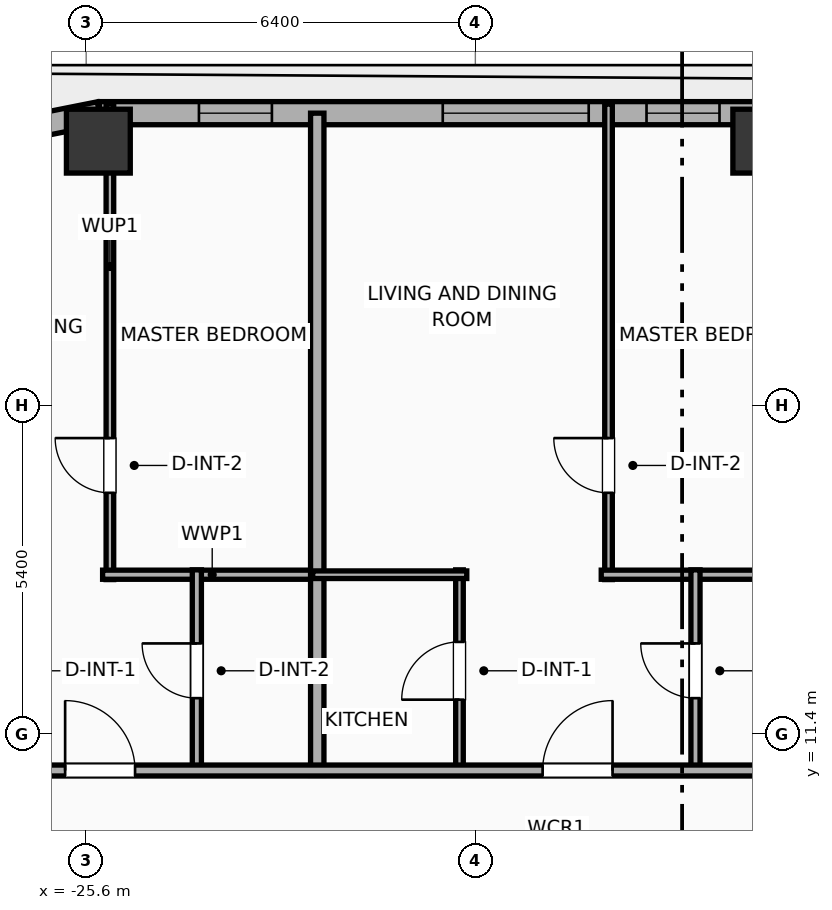
"""IFC4 building model, lengths in metres.
Left out: names, types, materials, properties, quantities, classifications, styles, units other than length and angle.
Written with IfcOpenShell. Run it as: python <this file> out.ifc"""

import sys

from ifc_helpers import new_model, si_unit, direction, frame, frame_2d, origin, origin_2d, place, context, subcontext, project, spatial, rectangle, hollow_rectangle, extrude, element, fill, save


model = new_model("IFC4")
c1 = context("Model", 3, precision=1e-05, world=origin(), true_north=direction((0.0, 1.0)))
c2 = subcontext(c1, "Body", "Model", "MODEL_VIEW")
j1 = project(units=[si_unit("LENGTHUNIT", "METRE"), si_unit("PLANEANGLEUNIT", "RADIAN")], contexts=[c1])
p1 = place(None, origin())
s1 = spatial("IfcSite", under=j1, at=p1, CompositionType="ELEMENT")
p2 = place(p1, origin())
s2 = spatial("IfcBuilding", under=s1, at=p2, CompositionType="ELEMENT")
p3 = place(p2, frame((0.0, 0.0, 85.8)))
s3 = spatial("IfcBuildingStorey", under=s2, at=p3, CompositionType="ELEMENT", Elevation=85.8)
for number, where, z_axis, x_axis in (
    (1, (-14.44, 21.15, -0.4), (0.0, 0.0, 1.0), (1.0, 0.0, 0.0)),
    (2, (-25.4, 21.15, -0.4), (0.0, 0.0, 1.0), (1.0, 0.0, 0.0)),
):
    element("IfcColumn", number, at=place(p3, frame(where, z_axis=z_axis, x_axis=x_axis)), inside=s3, PredefinedType="COLUMN", context=c2, shape_type="SweptSolid", body=[
        extrude(hollow_rectangle(XDim=1.05, YDim=1.05, WallThickness=0.036, at=origin_2d()), origin(), (0.0, 0.0, 1.0), 4.3),
    ])
p4 = place(p3, frame((-26.857, 21.316, 0.0), z_axis=(0.0, 0.0, 1.0), x_axis=(0.980755066645, 0.195242155415, 0.0)))
e3 = element("IfcWall", 3, at=p4, inside=s3, PredefinedType="ELEMENTEDWALL", context=c2, shape_type="SweptSolid", body=[
    extrude(rectangle(XDim=1.504, YDim=0.38, at=frame_2d((0.752, 0.0))), origin(), (0.0, 0.0, 1.0), 2.54),
])
p5 = place(p3, frame((-25.381, 21.61, 0.0), z_axis=(0.0, 0.0, 1.0), x_axis=(1.0, 0.0, 0.0)))
e4 = element("IfcWall", 4, at=p5, inside=s3, PredefinedType="ELEMENTEDWALL", context=c2, shape_type="SweptSolid", body=[
    extrude(rectangle(XDim=54.763, YDim=0.38, at=frame_2d((27.381, 0.0))), origin(), (0.0, 0.0, 1.0), 2.54),
])
p6 = place(p5, frame((5.645, 0.0, 0.75)))
e5 = element("IfcOpeningElement", 5, at=p6, cuts=e4, PredefinedType="OPENING", context=c2, shape_type="SweptSolid", body=[
    extrude(rectangle(XDim=2.4, YDim=1.45, at=frame_2d((1.2, 0.725))), frame((0.0, 0.2, 0.0), z_axis=(0.0, -1.0, 0.0), x_axis=(1.0, 0.0, 0.0)), (0.0, 0.0, 1.0), 0.4),
])
p7 = place(p5, frame((47.567, 0.0, 0.75)))
e6 = element("IfcOpeningElement", 6, at=p7, cuts=e4, PredefinedType="OPENING", context=c2, shape_type="SweptSolid", body=[
    extrude(rectangle(XDim=2.4, YDim=1.45, at=frame_2d((1.2, 0.725))), frame((0.0, 0.2, 0.0), z_axis=(0.0, -1.0, 0.0), x_axis=(1.0, 0.0, 0.0)), (0.0, 0.0, 1.0), 0.4),
])
p8 = place(p5, frame((1.635, 0.0, 0.55)))
e7 = element("IfcOpeningElement", 7, at=p8, cuts=e4, PredefinedType="OPENING", context=c2, shape_type="SweptSolid", body=[
    extrude(rectangle(XDim=1.2, YDim=1.15, at=frame_2d((0.6, 0.575))), frame((0.0, 0.2, 0.0), z_axis=(0.0, -1.0, 0.0), x_axis=(1.0, 0.0, 0.0)), (0.0, 0.0, 1.0), 0.4),
])
p9 = place(p5, frame((8.996, 0.0, 0.55)))
e8 = element("IfcOpeningElement", 8, at=p9, cuts=e4, PredefinedType="OPENING", context=c2, shape_type="SweptSolid", body=[
    extrude(rectangle(XDim=1.2, YDim=1.15, at=frame_2d((0.6, 0.575))), frame((0.0, 0.2, 0.0), z_axis=(0.0, -1.0, 0.0), x_axis=(1.0, 0.0, 0.0)), (0.0, 0.0, 1.0), 0.4),
])
p10 = place(p5, frame((13.576, 0.0, 0.55)))
e9 = element("IfcOpeningElement", 9, at=p10, cuts=e4, PredefinedType="OPENING", context=c2, shape_type="SweptSolid", body=[
    extrude(rectangle(XDim=1.2, YDim=1.15, at=frame_2d((0.6, 0.575))), frame((0.0, 0.2, 0.0), z_axis=(0.0, -1.0, 0.0), x_axis=(1.0, 0.0, 0.0)), (0.0, 0.0, 1.0), 0.4),
])
p11 = place(p5, frame((17.676, 0.0, 0.55)))
e10 = element("IfcOpeningElement", 10, at=p11, cuts=e4, PredefinedType="OPENING", context=c2, shape_type="SweptSolid", body=[
    extrude(rectangle(XDim=1.2, YDim=1.15, at=frame_2d((0.6, 0.575))), frame((0.0, 0.2, 0.0), z_axis=(0.0, -1.0, 0.0), x_axis=(1.0, 0.0, 0.0)), (0.0, 0.0, 1.0), 0.4),
])
p12 = place(p5, frame((20.319, 0.0, 0.55)))
e11 = element("IfcOpeningElement", 11, at=p12, cuts=e4, PredefinedType="OPENING", context=c2, shape_type="SweptSolid", body=[
    extrude(rectangle(XDim=0.85, YDim=1.15, at=frame_2d((0.425, 0.575))), frame((0.0, 0.2, 0.0), z_axis=(0.0, -1.0, 0.0), x_axis=(1.0, 0.0, 0.0)), (0.0, 0.0, 1.0), 0.4),
])
p13 = place(p5, frame((24.844, 0.0, 0.55)))
e12 = element("IfcOpeningElement", 12, at=p13, cuts=e4, PredefinedType="OPENING", context=c2, shape_type="SweptSolid", body=[
    extrude(rectangle(XDim=1.2, YDim=1.15, at=frame_2d((0.6, 0.575))), frame((0.0, 0.2, 0.0), z_axis=(0.0, -1.0, 0.0), x_axis=(1.0, 0.0, 0.0)), (0.0, 0.0, 1.0), 0.4),
])
p14 = place(p5, frame((29.976, 0.0, 0.55)))
e13 = element("IfcOpeningElement", 13, at=p14, cuts=e4, PredefinedType="OPENING", context=c2, shape_type="SweptSolid", body=[
    extrude(rectangle(XDim=1.2, YDim=1.15, at=frame_2d((0.6, 0.575))), frame((0.0, 0.2, 0.0), z_axis=(0.0, -1.0, 0.0), x_axis=(1.0, 0.0, 0.0)), (0.0, 0.0, 1.0), 0.4),
])
p15 = place(p5, frame((34.076, 0.0, 0.55)))
e14 = element("IfcOpeningElement", 14, at=p15, cuts=e4, PredefinedType="OPENING", context=c2, shape_type="SweptSolid", body=[
    extrude(rectangle(XDim=1.2, YDim=1.15, at=frame_2d((0.6, 0.575))), frame((0.0, 0.2, 0.0), z_axis=(0.0, -1.0, 0.0), x_axis=(1.0, 0.0, 0.0)), (0.0, 0.0, 1.0), 0.4),
])
p16 = place(p5, frame((38.176, 0.0, 0.55)))
e15 = element("IfcOpeningElement", 15, at=p16, cuts=e4, PredefinedType="OPENING", context=c2, shape_type="SweptSolid", body=[
    extrude(rectangle(XDim=1.2, YDim=1.15, at=frame_2d((0.6, 0.575))), frame((0.0, 0.2, 0.0), z_axis=(0.0, -1.0, 0.0), x_axis=(1.0, 0.0, 0.0)), (0.0, 0.0, 1.0), 0.4),
])
p17 = place(p5, frame((41.796, 0.0, 0.55)))
e16 = element("IfcOpeningElement", 16, at=p17, cuts=e4, PredefinedType="OPENING", context=c2, shape_type="SweptSolid", body=[
    extrude(rectangle(XDim=1.2, YDim=1.15, at=frame_2d((0.6, 0.575))), frame((0.0, 0.2, 0.0), z_axis=(0.0, -1.0, 0.0), x_axis=(1.0, 0.0, 0.0)), (0.0, 0.0, 1.0), 0.4),
])
p18 = place(p5, frame((45.336, 0.0, 0.55)))
e17 = element("IfcOpeningElement", 17, at=p18, cuts=e4, PredefinedType="OPENING", context=c2, shape_type="SweptSolid", body=[
    extrude(rectangle(XDim=1.2, YDim=1.15, at=frame_2d((0.6, 0.575))), frame((0.0, 0.2, 0.0), z_axis=(0.0, -1.0, 0.0), x_axis=(1.0, 0.0, 0.0)), (0.0, 0.0, 1.0), 0.4),
])
p19 = place(p5, frame((53.022, 0.0, 0.55)))
e18 = element("IfcOpeningElement", 18, at=p19, cuts=e4, PredefinedType="OPENING", context=c2, shape_type="SweptSolid", body=[
    extrude(rectangle(XDim=0.85, YDim=1.15, at=frame_2d((0.425, 0.575))), frame((0.0, 0.2, 0.0), z_axis=(0.0, -1.0, 0.0), x_axis=(1.0, 0.0, 0.0)), (0.0, 0.0, 1.0), 0.4),
])
p20 = place(p3, frame((-25.21, 13.94, 0.0), z_axis=(0.0, 0.0, 1.0), x_axis=(0.0, 1.0, 0.0)))
e19 = element("IfcWall", 19, at=p20, inside=s3, PredefinedType="PARTITIONING", context=c2, shape_type="SweptSolid", body=[
    extrude(rectangle(XDim=7.82, YDim=0.125, at=frame_2d((3.91, 0.0))), origin(), (0.0, 0.0, 1.0), 3.65),
])
p21 = place(p20, frame((1.427, 0.0, 0.0)))
e20 = element("IfcOpeningElement", 20, at=p21, cuts=e19, PredefinedType="OPENING", context=c2, shape_type="SweptSolid", body=[
    extrude(rectangle(XDim=0.9, YDim=2.05, at=frame_2d((0.45, 1.025))), frame((0.0, 0.073, 0.0), z_axis=(0.0, -1.0, 0.0), x_axis=(1.0, 0.0, 0.0)), (0.0, 0.0, 1.0), 0.145),
])
p22 = place(p3, frame((-25.33, 14.02, 0.0), z_axis=(0.0, 0.0, 1.0), x_axis=(1.0, 0.0, 0.0)))
e21 = element("IfcWall", 21, at=p22, inside=s3, PredefinedType="PLUMBINGWALL", context=c2, shape_type="SweptSolid", body=[
    extrude(rectangle(XDim=3.605, YDim=0.15, at=frame_2d((1.802, 0.0))), origin(), (0.0, 0.0, 1.0), 3.65),
])
p23 = place(p3, frame((-23.78, 10.78, 0.0), z_axis=(0.0, 0.0, 1.0), x_axis=(0.0, 1.0, 0.0)))
e22 = element("IfcWall", 22, at=p23, inside=s3, PredefinedType="PLUMBINGWALL", context=c2, shape_type="SweptSolid", body=[
    extrude(rectangle(XDim=3.32, YDim=0.15, at=frame_2d((1.66, 0.0))), origin(), (0.0, 0.0, 1.0), 3.65),
])
p24 = place(p23, frame((1.21, 0.0, 0.0)))
e23 = element("IfcOpeningElement", 23, at=p24, cuts=e22, PredefinedType="OPENING", context=c2, shape_type="SweptSolid", body=[
    extrude(rectangle(XDim=0.9, YDim=2.05, at=frame_2d((0.45, 1.025))), frame((0.0, 0.085, 0.0), z_axis=(0.0, -1.0, 0.0), x_axis=(1.0, 0.0, 0.0)), (0.0, 0.0, 1.0), 0.17),
])
p25 = place(p3, frame((-21.8, 10.72, 0.0), z_axis=(0.0, 0.0, 1.0), x_axis=(0.0, 1.0, 0.0)))
e24 = element("IfcWall", 24, at=p25, inside=s3, PredefinedType="PARTITIONING", context=c2, shape_type="SweptSolid", body=[
    extrude(rectangle(XDim=10.89, YDim=0.22, at=frame_2d((5.445, 0.0))), origin(), (0.0, 0.0, 1.0), 3.65),
])
p26 = place(p3, frame((-17.01, 13.94, 0.0), z_axis=(0.0, 0.0, 1.0), x_axis=(0.0, 1.0, 0.0)))
e25 = element("IfcWall", 25, at=p26, inside=s3, PredefinedType="PARTITIONING", context=c2, shape_type="SweptSolid", body=[
    extrude(rectangle(XDim=7.82, YDim=0.125, at=frame_2d((3.91, 0.0))), origin(), (0.0, 0.0, 1.0), 3.65),
])
p27 = place(p26, frame((1.427, 0.0, 0.0)))
e26 = element("IfcOpeningElement", 26, at=p27, cuts=e25, PredefinedType="OPENING", context=c2, shape_type="SweptSolid", body=[
    extrude(rectangle(XDim=0.9, YDim=2.05, at=frame_2d((0.45, 1.025))), frame((0.0, 0.073, 0.0), z_axis=(0.0, -1.0, 0.0), x_axis=(1.0, 0.0, 0.0)), (0.0, 0.0, 1.0), 0.145),
])
p28 = place(p3, frame((-17.13, 14.02, 0.0), z_axis=(0.0, 0.0, 1.0), x_axis=(1.0, 0.0, 0.0)))
e27 = element("IfcWall", 27, at=p28, inside=s3, PredefinedType="PLUMBINGWALL", context=c2, shape_type="SweptSolid", body=[
    extrude(rectangle(XDim=3.605, YDim=0.15, at=frame_2d((1.802, 0.0))), origin(), (0.0, 0.0, 1.0), 3.65),
])
p29 = place(p3, frame((-19.461, 10.78, 0.0), z_axis=(0.0, 0.0, 1.0), x_axis=(0.0, 1.0, 0.0)))
e28 = element("IfcWall", 28, at=p29, inside=s3, PredefinedType="PARTITIONING", context=c2, shape_type="SweptSolid", body=[
    extrude(rectangle(XDim=3.32, YDim=0.125, at=frame_2d((1.66, 0.0))), origin(), (0.0, 0.0, 1.0), 3.65),
])
p30 = place(p29, frame((1.185, 0.0, 0.0)))
e29 = element("IfcOpeningElement", 29, at=p30, cuts=e28, PredefinedType="OPENING", context=c2, shape_type="SweptSolid", body=[
    extrude(rectangle(XDim=0.95, YDim=2.05, at=frame_2d((0.475, 1.025))), frame((0.0, 0.073, 0.0), z_axis=(0.0, -1.0, 0.0), x_axis=(1.0, 0.0, 0.0)), (0.0, 0.0, 1.0), 0.145),
])
p31 = place(p3, frame((-21.875, 14.02, 0.0), z_axis=(0.0, 0.0, 1.0), x_axis=(1.0, 0.0, 0.0)))
e30 = element("IfcWall", 30, at=p31, inside=s3, PredefinedType="PARTITIONING", context=c2, shape_type="SweptSolid", body=[
    extrude(rectangle(XDim=2.534, YDim=0.125, at=frame_2d((1.267, 0.0))), origin(), (0.0, 0.0, 1.0), 3.65),
])
p32 = place(p3, frame((-15.58, 10.78, 0.0), z_axis=(0.0, 0.0, 1.0), x_axis=(0.0, 1.0, 0.0)))
e31 = element("IfcWall", 31, at=p32, inside=s3, PredefinedType="PLUMBINGWALL", context=c2, shape_type="SweptSolid", body=[
    extrude(rectangle(XDim=3.32, YDim=0.15, at=frame_2d((1.66, 0.0))), origin(), (0.0, 0.0, 1.0), 2.54),
])
p33 = place(p32, frame((1.21, 0.0, 0.0)))
e32 = element("IfcOpeningElement", 32, at=p33, cuts=e31, PredefinedType="OPENING", context=c2, shape_type="SweptSolid", body=[
    extrude(rectangle(XDim=0.9, YDim=2.05, at=frame_2d((0.45, 1.025))), frame((0.0, 0.085, 0.0), z_axis=(0.0, -1.0, 0.0), x_axis=(1.0, 0.0, 0.0)), (0.0, 0.0, 1.0), 0.17),
])
p34 = place(p3, frame((-29.21, 10.8, 0.0), z_axis=(0.0, 0.0, 1.0), x_axis=(1.0, 0.0, 0.0)))
e33 = element("IfcWall", 33, at=p34, inside=s3, PredefinedType="PARTITIONING", context=c2, shape_type="SweptSolid", body=[
    extrude(rectangle(XDim=62.42, YDim=0.18, at=frame_2d((31.21, 0.0))), origin(), (0.0, 0.0, 1.0), 3.65),
])
p35 = place(p34, frame((3.264, 0.0, 0.0)))
e34 = element("IfcOpeningElement", 34, at=p35, cuts=e33, PredefinedType="OPENING", context=c2, shape_type="SweptSolid", body=[
    extrude(rectangle(XDim=1.15, YDim=2.05, at=frame_2d((0.575, 1.025))), frame((0.0, 0.1, 0.0), z_axis=(0.0, -1.0, 0.0), x_axis=(1.0, 0.0, 0.0)), (0.0, 0.0, 1.0), 0.2),
])
p36 = place(p34, frame((11.116, 0.0, 0.0)))
e35 = element("IfcOpeningElement", 35, at=p36, cuts=e33, PredefinedType="OPENING", context=c2, shape_type="SweptSolid", body=[
    extrude(rectangle(XDim=1.15, YDim=2.05, at=frame_2d((0.575, 1.025))), frame((0.0, 0.1, 0.0), z_axis=(0.0, -1.0, 0.0), x_axis=(1.0, 0.0, 0.0)), (0.0, 0.0, 1.0), 0.2),
])
p37 = place(p34, frame((19.3, 0.0, 0.0)))
e36 = element("IfcOpeningElement", 36, at=p37, cuts=e33, PredefinedType="OPENING", context=c2, shape_type="SweptSolid", body=[
    extrude(rectangle(XDim=1.15, YDim=2.05, at=frame_2d((0.575, 1.025))), frame((0.0, 0.1, 0.0), z_axis=(0.0, -1.0, 0.0), x_axis=(1.0, 0.0, 0.0)), (0.0, 0.0, 1.0), 0.2),
])
p38 = place(p34, frame((27.452, 0.0, 0.0)))
e37 = element("IfcOpeningElement", 37, at=p38, cuts=e33, PredefinedType="OPENING", context=c2, shape_type="SweptSolid", body=[
    extrude(rectangle(XDim=1.15, YDim=2.05, at=frame_2d((0.575, 1.025))), frame((0.0, 0.1, 0.0), z_axis=(0.0, -1.0, 0.0), x_axis=(1.0, 0.0, 0.0)), (0.0, 0.0, 1.0), 0.2),
])
p39 = place(p34, frame((35.697, 0.0, 0.0)))
e38 = element("IfcOpeningElement", 38, at=p39, cuts=e33, PredefinedType="OPENING", context=c2, shape_type="SweptSolid", body=[
    extrude(rectangle(XDim=1.15, YDim=2.05, at=frame_2d((0.575, 1.025))), frame((0.0, 0.1, 0.0), z_axis=(0.0, -1.0, 0.0), x_axis=(1.0, 0.0, 0.0)), (0.0, 0.0, 1.0), 0.2),
])
p40 = place(p34, frame((43.899, 0.0, 0.0)))
e39 = element("IfcOpeningElement", 39, at=p40, cuts=e33, PredefinedType="OPENING", context=c2, shape_type="SweptSolid", body=[
    extrude(rectangle(XDim=1.15, YDim=2.05, at=frame_2d((0.575, 1.025))), frame((0.0, 0.1, 0.0), z_axis=(0.0, -1.0, 0.0), x_axis=(1.0, 0.0, 0.0)), (0.0, 0.0, 1.0), 0.2),
])
p41 = place(p34, frame((51.599, 0.0, 0.0)))
e40 = element("IfcOpeningElement", 40, at=p41, cuts=e33, PredefinedType="OPENING", context=c2, shape_type="SweptSolid", body=[
    extrude(rectangle(XDim=1.15, YDim=2.05, at=frame_2d((0.575, 1.025))), frame((0.0, 0.1, 0.0), z_axis=(0.0, -1.0, 0.0), x_axis=(1.0, 0.0, 0.0)), (0.0, 0.0, 1.0), 0.2),
])
p42 = place(p34, frame((59.242, 0.0, 0.0)))
e41 = element("IfcOpeningElement", 41, at=p42, cuts=e33, PredefinedType="OPENING", context=c2, shape_type="SweptSolid", body=[
    extrude(rectangle(XDim=0.9, YDim=2.05, at=frame_2d((0.45, 1.025))), frame((0.0, 0.1, 0.0), z_axis=(0.0, -1.0, 0.0), x_axis=(1.0, 0.0, 0.0)), (0.0, 0.0, 1.0), 0.2),
])
p43 = place(p6, origin())
e42 = element("IfcWindow", 42, at=p43, inside=s3, PartitioningType="SINGLE_PANEL", PredefinedType="WINDOW", context=c2, shape_type="SweptSolid", body=[
    extrude(rectangle(XDim=2.4, YDim=1.45, at=frame_2d((1.2, 0.725))), frame((0.0, 0.03, 0.0), z_axis=(0.0, -1.0, 0.0), x_axis=(1.0, 0.0, 0.0)), (0.0, 0.0, 1.0), 0.06),
])
fill(e5, e42)
p44 = place(p8, origin())
e43 = element("IfcWindow", 43, at=p44, inside=s3, PartitioningType="SINGLE_PANEL", PredefinedType="WINDOW", context=c2, shape_type="SweptSolid", body=[
    extrude(rectangle(XDim=1.2, YDim=1.15, at=frame_2d((0.6, 0.575))), frame((0.0, 0.03, 0.0), z_axis=(0.0, -1.0, 0.0), x_axis=(1.0, 0.0, 0.0)), (0.0, 0.0, 1.0), 0.06),
])
fill(e7, e43)
p45 = place(p9, origin())
e44 = element("IfcWindow", 44, at=p45, inside=s3, PartitioningType="SINGLE_PANEL", PredefinedType="WINDOW", context=c2, shape_type="SweptSolid", body=[
    extrude(rectangle(XDim=1.2, YDim=1.15, at=frame_2d((0.6, 0.575))), frame((0.0, 0.03, 0.0), z_axis=(0.0, -1.0, 0.0), x_axis=(1.0, 0.0, 0.0)), (0.0, 0.0, 1.0), 0.06),
])
fill(e8, e44)
p46 = place(p21, origin())
e45 = element("IfcDoor", 45, at=p46, inside=s3, OperationType="SINGLE_SWING_RIGHT", PredefinedType="DOOR", context=c2, shape_type="SweptSolid", body=[
    extrude(rectangle(XDim=0.9, YDim=2.05, at=frame_2d((0.45, 1.025))), frame((0.0, 0.025, 0.0), z_axis=(0.0, -1.0, 0.0), x_axis=(1.0, 0.0, 0.0)), (0.0, 0.0, 1.0), 0.05),
])
fill(e20, e45)
p47 = place(p24, origin())
e46 = element("IfcDoor", 46, at=p47, inside=s3, OperationType="SINGLE_SWING_RIGHT", PredefinedType="DOOR", context=c2, shape_type="SweptSolid", body=[
    extrude(rectangle(XDim=0.9, YDim=2.05, at=frame_2d((0.45, 1.025))), frame((0.0, 0.025, 0.0), z_axis=(0.0, -1.0, 0.0), x_axis=(1.0, 0.0, 0.0)), (0.0, 0.0, 1.0), 0.05),
])
fill(e23, e46)
p48 = place(p27, origin())
e47 = element("IfcDoor", 47, at=p48, inside=s3, OperationType="SINGLE_SWING_RIGHT", PredefinedType="DOOR", context=c2, shape_type="SweptSolid", body=[
    extrude(rectangle(XDim=0.9, YDim=2.05, at=frame_2d((0.45, 1.025))), frame((0.0, 0.025, 0.0), z_axis=(0.0, -1.0, 0.0), x_axis=(1.0, 0.0, 0.0)), (0.0, 0.0, 1.0), 0.05),
])
fill(e26, e47)
p49 = place(p30, origin())
e48 = element("IfcDoor", 48, at=p49, inside=s3, OperationType="SINGLE_SWING_LEFT", PredefinedType="DOOR", context=c2, shape_type="SweptSolid", body=[
    extrude(rectangle(XDim=0.95, YDim=2.05, at=frame_2d((0.475, 1.025))), frame((0.0, 0.025, 0.0), z_axis=(0.0, -1.0, 0.0), x_axis=(1.0, 0.0, 0.0)), (0.0, 0.0, 1.0), 0.05),
])
fill(e29, e48)
p50 = place(p33, origin())
e49 = element("IfcDoor", 49, at=p50, inside=s3, OperationType="SINGLE_SWING_RIGHT", PredefinedType="DOOR", context=c2, shape_type="SweptSolid", body=[
    extrude(rectangle(XDim=0.9, YDim=2.05, at=frame_2d((0.45, 1.025))), frame((0.0, 0.025, 0.0), z_axis=(0.0, -1.0, 0.0), x_axis=(1.0, 0.0, 0.0)), (0.0, 0.0, 1.0), 0.05),
])
fill(e32, e49)
p51 = place(p35, origin())
e50 = element("IfcDoor", 50, at=p51, inside=s3, OperationType="SINGLE_SWING_LEFT", PredefinedType="DOOR", context=c2, shape_type="SweptSolid", body=[
    extrude(rectangle(XDim=1.15, YDim=2.05, at=frame_2d((0.575, 1.025))), frame((0.0, 0.025, 0.0), z_axis=(0.0, -1.0, 0.0), x_axis=(1.0, 0.0, 0.0)), (0.0, 0.0, 1.0), 0.05),
])
fill(e34, e50)
p52 = place(p36, origin())
e51 = element("IfcDoor", 51, at=p52, inside=s3, OperationType="SINGLE_SWING_RIGHT", PredefinedType="DOOR", context=c2, shape_type="SweptSolid", body=[
    extrude(rectangle(XDim=1.15, YDim=2.05, at=frame_2d((0.575, 1.025))), frame((0.0, 0.025, 0.0), z_axis=(0.0, -1.0, 0.0), x_axis=(1.0, 0.0, 0.0)), (0.0, 0.0, 1.0), 0.05),
])
fill(e35, e51)
save(model, sys.argv[1])
